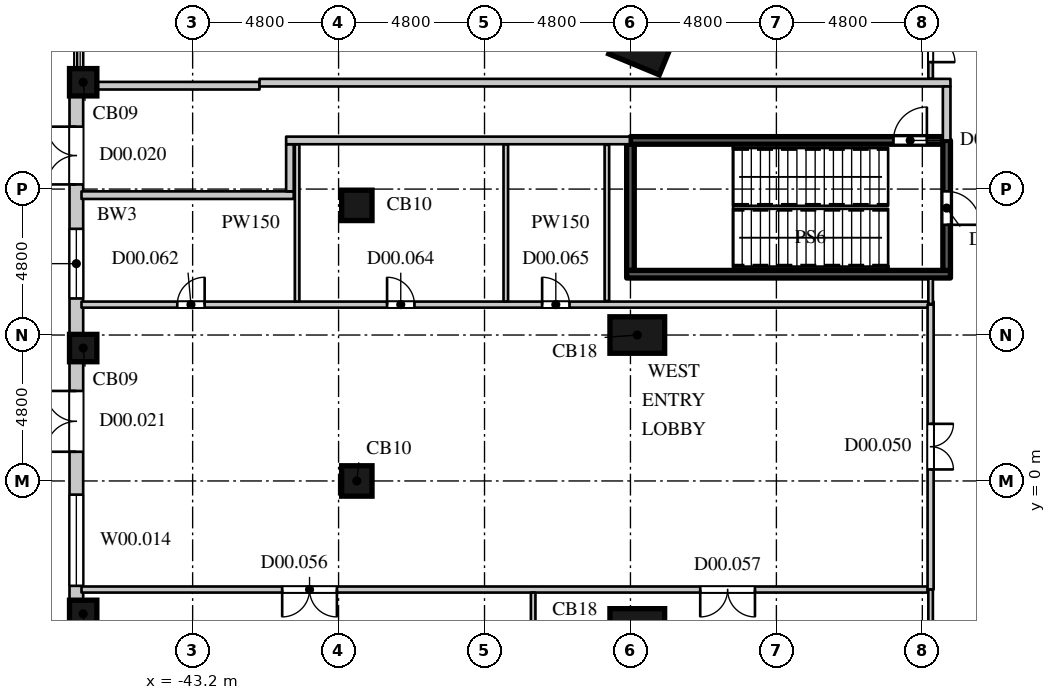
"""IFC4 building model, lengths in metres.
Left out: names, types, materials, properties, quantities, classifications, styles, units other than length and angle.
Written with IfcOpenShell. Run it as: python <this file> out.ifc"""

import sys

from ifc_helpers import new_model, si_unit, direction, frame, frame_2d, origin, origin_2d, place, context, subcontext, project, spatial, rectangle, extrude, element, fill, save


model = new_model("IFC4")
c1 = context("Model", 3, precision=1e-05, world=origin(), true_north=direction((0.0, 1.0)))
c2 = subcontext(c1, "Body", "Model", "MODEL_VIEW")
j1 = project(units=[si_unit("LENGTHUNIT", "METRE"), si_unit("PLANEANGLEUNIT", "RADIAN")], contexts=[c1])
p1 = place(None, origin())
s1 = spatial("IfcSite", under=j1, at=p1, CompositionType="ELEMENT")
p2 = place(p1, origin())
s2 = spatial("IfcBuilding", under=s1, at=p2, CompositionType="ELEMENT")
p3 = place(p2, origin())
s3 = spatial("IfcBuildingStorey", under=s2, at=p3, CompositionType="ELEMENT", Elevation=0.0)
p4 = place(p3, frame((-28.575, -4.8, 0.0), z_axis=(0.0, 0.0, 1.0), x_axis=(0.0, -1.0, 0.0)))
e1 = element("IfcColumn", 1, at=p4, inside=s3, PredefinedType="COLUMN", context=c2, shape_type="SweptSolid", body=[
    extrude(rectangle(XDim=1.2, YDim=1.8, at=origin_2d()), origin(), (0.0, 0.0, 1.0), 6.0),
])
p5 = place(p3, frame((-46.8, -4.371, 0.0), z_axis=(0.0, 0.0, 1.0), x_axis=(1.0, 0.0, 0.0)))
e2 = element("IfcColumn", 2, at=p5, inside=s3, PredefinedType="COLUMN", context=c2, shape_type="SweptSolid", body=[
    extrude(rectangle(XDim=0.9, YDim=0.9, at=origin_2d()), origin(), (0.0, 0.0, 1.0), 6.0),
])
p6 = place(p3, frame((-37.8, 0.0, 0.0), z_axis=(0.0, 0.0, 1.0), x_axis=(1.0, 0.0, 0.0)))
e3 = element("IfcColumn", 3, at=p6, inside=s3, PredefinedType="COLUMN", context=c2, shape_type="SweptSolid", body=[
    extrude(rectangle(XDim=1.0, YDim=1.0, at=origin_2d()), origin(), (0.0, 0.0, 1.0), 6.0),
])
p7 = place(p3, frame((-46.8, 4.371, 0.0), z_axis=(0.0, 0.0, 1.0), x_axis=(1.0, 0.0, 0.0)))
e4 = element("IfcColumn", 4, at=p7, inside=s3, PredefinedType="COLUMN", context=c2, shape_type="SweptSolid", body=[
    extrude(rectangle(XDim=0.9, YDim=0.9, at=origin_2d()), origin(), (0.0, 0.0, 1.0), 6.0),
])
p8 = place(p3, frame((-28.575, 4.8, 0.0), z_axis=(0.0, 0.0, 1.0), x_axis=(0.0, -1.0, 0.0)))
e5 = element("IfcColumn", 5, at=p8, inside=s3, PredefinedType="COLUMN", context=c2, shape_type="SweptSolid", body=[
    extrude(rectangle(XDim=1.2, YDim=1.8, at=origin_2d()), origin(), (0.0, 0.0, 1.0), 6.0),
])
p9 = place(p3, frame((-37.8, 9.064, 0.0), z_axis=(0.0, 0.0, 1.0), x_axis=(1.0, 0.0, 0.0)))
e6 = element("IfcColumn", 6, at=p9, inside=s3, PredefinedType="COLUMN", context=c2, shape_type="SweptSolid", body=[
    extrude(rectangle(XDim=1.0, YDim=1.0, at=origin_2d()), origin(), (0.0, 0.0, 1.0), 6.0),
])
p10 = place(p3, frame((-46.8, 13.114, 0.0), z_axis=(0.0, 0.0, 1.0), x_axis=(1.0, 0.0, 0.0)))
e7 = element("IfcColumn", 7, at=p10, inside=s3, PredefinedType="COLUMN", context=c2, shape_type="SweptSolid", body=[
    extrude(rectangle(XDim=0.9, YDim=0.9, at=origin_2d()), origin(), (0.0, 0.0, 1.0), 6.0),
])
p11 = place(p3, frame((-28.454, 14.257, 0.0), z_axis=(0.0, 0.0, 1.0), x_axis=(-0.382683496864, -0.923879505795, 0.0)))
e8 = element("IfcColumn", 8, at=p11, inside=s3, PredefinedType="COLUMN", context=c2, shape_type="SweptSolid", body=[
    extrude(rectangle(XDim=1.2, YDim=1.8, at=origin_2d()), origin(), (0.0, 0.0, 1.0), 6.0),
])
p12 = place(p3, frame((-47.025, 12.664, 0.0), z_axis=(0.0, 0.0, 1.0), x_axis=(0.0, -1.0, 0.0)))
e9 = element("IfcWall", 9, at=p12, inside=s3, PredefinedType="ELEMENTEDWALL", context=c2, shape_type="SweptSolid", body=[
    extrude(rectangle(XDim=7.842, YDim=0.45, at=frame_2d((3.921, 0.0))), origin(), (0.0, 0.0, 1.0), 4.8),
])
p13 = place(p12, frame((1.01, 0.0, 0.0)))
e10 = element("IfcOpeningElement", 10, at=p13, cuts=e9, PredefinedType="OPENING", context=c2, shape_type="SweptSolid", body=[
    extrude(rectangle(XDim=1.9, YDim=2.7, at=frame_2d((0.95, 1.35))), frame((0.0, 0.235, 0.0), z_axis=(0.0, -1.0, 0.0), x_axis=(1.0, 0.0, 0.0)), (0.0, 0.0, 1.0), 0.47),
])
p14 = place(p12, frame((4.371, 0.0, 1.05)))
e11 = element("IfcOpeningElement", 11, at=p14, cuts=e9, PredefinedType="OPENING", context=c2, shape_type="SweptSolid", body=[
    extrude(rectangle(XDim=2.29, YDim=2.7, at=frame_2d((1.145, 1.35))), frame((0.0, 0.235, 0.0), z_axis=(0.0, -1.0, 0.0), x_axis=(1.0, 0.0, 0.0)), (0.0, 0.0, 1.0), 0.47),
])
p15 = place(p3, frame((-47.025, 3.921, 0.0), z_axis=(0.0, 0.0, 1.0), x_axis=(0.0, -1.0, 0.0)))
e12 = element("IfcWall", 12, at=p15, inside=s3, PredefinedType="ELEMENTEDWALL", context=c2, shape_type="SweptSolid", body=[
    extrude(rectangle(XDim=7.842, YDim=0.45, at=frame_2d((3.921, 0.0))), origin(), (0.0, 0.0, 1.0), 4.8),
])
p16 = place(p15, frame((0.961, 0.0, 0.0)))
e13 = element("IfcOpeningElement", 13, at=p16, cuts=e12, PredefinedType="OPENING", context=c2, shape_type="SweptSolid", body=[
    extrude(rectangle(XDim=2.0, YDim=2.7, at=frame_2d((1.0, 1.35))), frame((0.0, 0.235, 0.0), z_axis=(0.0, -1.0, 0.0), x_axis=(1.0, 0.0, 0.0)), (0.0, 0.0, 1.0), 0.47),
])
p17 = place(p15, frame((4.371, 0.0, 1.05)))
e14 = element("IfcOpeningElement", 14, at=p17, cuts=e12, PredefinedType="OPENING", context=c2, shape_type="SweptSolid", body=[
    extrude(rectangle(XDim=3.0, YDim=2.7, at=frame_2d((1.5, 1.35))), frame((0.0, 0.235, 0.0), z_axis=(0.0, -1.0, 0.0), x_axis=(1.0, 0.0, 0.0)), (0.0, 0.0, 1.0), 0.47),
])
p18 = place(p3, frame((-46.855, -3.571, 0.0), z_axis=(0.0, 0.0, 1.0), x_axis=(1.0, 0.0, 0.0)))
e15 = element("IfcWall", 15, at=p18, inside=s3, PredefinedType="PARTITIONING", context=c2, shape_type="SweptSolid", body=[
    extrude(rectangle(XDim=27.827, YDim=0.2, at=frame_2d((13.914, 0.0))), origin(), (0.0, 0.0, 1.0), 5.65),
])
p19 = place(p18, frame((6.6, 0.0, 0.0)))
e16 = element("IfcOpeningElement", 16, at=p19, cuts=e15, PredefinedType="OPENING", context=c2, shape_type="SweptSolid", body=[
    extrude(rectangle(XDim=1.8, YDim=2.4, at=frame_2d((0.9, 1.2))), frame((0.0, 0.11, 0.0), z_axis=(0.0, -1.0, 0.0), x_axis=(1.0, 0.0, 0.0)), (0.0, 0.0, 1.0), 0.22),
])
p20 = place(p18, frame((20.35, 0.0, 0.0)))
e17 = element("IfcOpeningElement", 17, at=p20, cuts=e15, PredefinedType="OPENING", context=c2, shape_type="SweptSolid", body=[
    extrude(rectangle(XDim=1.8, YDim=2.4, at=frame_2d((0.9, 1.2))), frame((0.0, 0.11, 0.0), z_axis=(0.0, -1.0, 0.0), x_axis=(1.0, 0.0, 0.0)), (0.0, 0.0, 1.0), 0.22),
])
p21 = place(p3, frame((-46.855, 5.8, 0.0), z_axis=(0.0, 0.0, 1.0), x_axis=(1.0, 0.0, 0.0)))
e18 = element("IfcWall", 18, at=p21, inside=s3, PredefinedType="PARTITIONING", context=c2, shape_type="SweptSolid", body=[
    extrude(rectangle(XDim=28.027, YDim=0.2, at=frame_2d((14.014, 0.0))), origin(), (0.0, 0.0, 1.0), 5.65),
])
p22 = place(p21, frame((3.15, 0.0, 0.0)))
e19 = element("IfcOpeningElement", 19, at=p22, cuts=e18, PredefinedType="OPENING", context=c2, shape_type="SweptSolid", body=[
    extrude(rectangle(XDim=0.9, YDim=2.2, at=frame_2d((0.45, 1.1))), frame((0.0, 0.11, 0.0), z_axis=(0.0, -1.0, 0.0), x_axis=(1.0, 0.0, 0.0)), (0.0, 0.0, 1.0), 0.22),
])
p23 = place(p21, frame((10.05, 0.0, 0.0)))
e20 = element("IfcOpeningElement", 20, at=p23, cuts=e18, PredefinedType="OPENING", context=c2, shape_type="SweptSolid", body=[
    extrude(rectangle(XDim=0.9, YDim=2.2, at=frame_2d((0.45, 1.1))), frame((0.0, 0.11, 0.0), z_axis=(0.0, -1.0, 0.0), x_axis=(1.0, 0.0, 0.0)), (0.0, 0.0, 1.0), 0.22),
])
p24 = place(p21, frame((15.15, 0.0, 0.0)))
e21 = element("IfcOpeningElement", 21, at=p24, cuts=e18, PredefinedType="OPENING", context=c2, shape_type="SweptSolid", body=[
    extrude(rectangle(XDim=0.9, YDim=2.2, at=frame_2d((0.45, 1.1))), frame((0.0, 0.11, 0.0), z_axis=(0.0, -1.0, 0.0), x_axis=(1.0, 0.0, 0.0)), (0.0, 0.0, 1.0), 0.22),
])
p25 = place(p3, frame((-18.928, -3.571, 0.0), z_axis=(0.0, 0.0, 1.0), x_axis=(0.0, 1.0, 0.0)))
e22 = element("IfcWall", 22, at=p25, inside=s3, PredefinedType="PARTITIONING", context=c2, shape_type="SweptSolid", body=[
    extrude(rectangle(XDim=9.371, YDim=0.2, at=frame_2d((4.686, 0.0))), origin(), (0.0, 0.0, 1.0), 5.65),
])
p26 = place(p25, frame((3.95, 0.0, 0.0)))
e23 = element("IfcOpeningElement", 23, at=p26, cuts=e22, PredefinedType="OPENING", context=c2, shape_type="SweptSolid", body=[
    extrude(rectangle(XDim=1.5, YDim=2.2, at=frame_2d((0.75, 1.1))), frame((0.0, 0.11, 0.0), z_axis=(0.0, -1.0, 0.0), x_axis=(1.0, 0.0, 0.0)), (0.0, 0.0, 1.0), 0.22),
])
for number, where, z_axis, x_axis in (
    (24, (-39.764, 5.9, 0.0), (0.0, 0.0, 1.0), (0.0, 1.0, 0.0)),
    (25, (-32.9, 5.9, 0.0), (0.0, 0.0, 1.0), (0.0, 1.0, 0.0)),
):
    element("IfcWall", number, at=place(p3, frame(where, z_axis=z_axis, x_axis=x_axis)), inside=s3, PredefinedType="PARTITIONING", context=c2, shape_type="SweptSolid", body=[
        extrude(rectangle(XDim=5.175, YDim=0.15, at=frame_2d((2.587, 0.0))), origin(), (0.0, 0.0, 1.0), 5.65),
    ])
p27 = place(p3, frame((-32.0, -5.725, 0.0), z_axis=(0.0, 0.0, 1.0), x_axis=(0.0, 1.0, 0.0)))
e26 = element("IfcWall", 26, at=p27, inside=s3, PredefinedType="PARTITIONING", context=c2, shape_type="SweptSolid", body=[
    extrude(rectangle(XDim=2.054, YDim=0.15, at=frame_2d((1.027, 0.0))), origin(), (0.0, 0.0, 1.0), 5.65),
])
p28 = place(p3, frame((-29.575, 5.92, 0.0), z_axis=(0.0, 0.0, 1.0), x_axis=(0.0, 1.0, 0.0)))
e27 = element("IfcWall", 27, at=p28, inside=s3, PredefinedType="PARTITIONING", context=c2, shape_type="SweptSolid", body=[
    extrude(rectangle(XDim=5.135, YDim=0.15, at=frame_2d((2.567, 0.0))), origin(), (0.0, 0.0, 1.0), 5.65),
])
p29 = place(p3, frame((-18.928, -6.675, 0.0), z_axis=(0.0, 0.0, 1.0), x_axis=(0.0, 1.0, 0.0)))
e28 = element("IfcWall", 28, at=p29, inside=s3, PredefinedType="PARTITIONING", context=c2, shape_type="SweptSolid", body=[
    extrude(rectangle(XDim=3.104, YDim=0.15, at=frame_2d((1.552, 0.0))), origin(), (0.0, 0.0, 1.0), 5.65),
])
p30 = place(p3, frame((-18.928, 5.82, 0.0), z_axis=(0.0, 0.0, 1.0), x_axis=(0.0, 1.0, 0.0)))
e29 = element("IfcWall", 29, at=p30, inside=s3, PredefinedType="PARTITIONING", context=c2, shape_type="SweptSolid", body=[
    extrude(rectangle(XDim=0.835, YDim=0.15, at=frame_2d((0.417, 0.0))), origin(), (0.0, 0.0, 1.0), 5.65),
])
p31 = place(p3, frame((-18.928, 13.225, 0.0), z_axis=(0.0, 0.0, 1.0), x_axis=(0.0, 1.0, 0.0)))
e30 = element("IfcWall", 30, at=p31, inside=s3, PredefinedType="PARTITIONING", context=c2, shape_type="SweptSolid", body=[
    extrude(rectangle(XDim=2.7, YDim=0.15, at=frame_2d((1.35, 0.0))), origin(), (0.0, 0.0, 1.0), 5.65),
])
p32 = place(p31, frame((0.55, 0.0, 0.0)))
e31 = element("IfcOpeningElement", 31, at=p32, cuts=e30, PredefinedType="OPENING", context=c2, shape_type="SweptSolid", body=[
    extrude(rectangle(XDim=1.6, YDim=2.4, at=frame_2d((0.8, 1.2))), frame((0.0, 0.085, 0.0), z_axis=(0.0, -1.0, 0.0), x_axis=(1.0, 0.0, 0.0)), (0.0, 0.0, 1.0), 0.17),
])
p33 = place(p3, frame((-28.8, 6.925, 0.0), z_axis=(0.0, 0.0, 1.0), x_axis=(0.0, 1.0, 0.0)))
e32 = element("IfcWall", 32, at=p33, inside=s3, PredefinedType="SHEAR", context=c2, shape_type="SweptSolid", body=[
    extrude(rectangle(XDim=4.15, YDim=0.25, at=frame_2d((2.075, 0.0))), origin(), (0.0, 0.0, 1.0), 5.65),
])
p34 = place(p3, frame((-28.925, 6.8, 0.0), z_axis=(0.0, 0.0, 1.0), x_axis=(1.0, 0.0, 0.0)))
e33 = element("IfcWall", 33, at=p34, inside=s3, PredefinedType="SHEAR", context=c2, shape_type="SweptSolid", body=[
    extrude(rectangle(XDim=10.65, YDim=0.25, at=frame_2d((5.325, 0.0))), origin(), (0.0, 0.0, 1.0), 5.65),
])
p35 = place(p3, frame((-28.8, 11.2, 0.0), z_axis=(0.0, 0.0, 1.0), x_axis=(1.0, 0.0, 0.0)))
e34 = element("IfcWall", 34, at=p35, inside=s3, PredefinedType="SHEAR", context=c2, shape_type="SweptSolid", body=[
    extrude(rectangle(XDim=10.275, YDim=0.25, at=frame_2d((5.138, 0.0))), origin(), (0.0, 0.0, 1.0), 5.65),
])
p36 = place(p35, frame((8.65, 0.0, 0.0)))
e35 = element("IfcOpeningElement", 35, at=p36, cuts=e34, PredefinedType="OPENING", context=c2, shape_type="SweptSolid", body=[
    extrude(rectangle(XDim=1.1, YDim=2.2, at=frame_2d((0.55, 1.1))), frame((0.0, 0.135, 0.0), z_axis=(0.0, -1.0, 0.0), x_axis=(1.0, 0.0, 0.0)), (0.0, 0.0, 1.0), 0.27),
])
p37 = place(p3, frame((-18.4, 6.925, 0.0), z_axis=(0.0, 0.0, 1.0), x_axis=(0.0, 1.0, 0.0)))
e36 = element("IfcWall", 36, at=p37, inside=s3, PredefinedType="SHEAR", context=c2, shape_type="SweptSolid", body=[
    extrude(rectangle(XDim=4.275, YDim=0.25, at=frame_2d((2.137, 0.0))), origin(), (0.0, 0.0, 1.0), 5.65),
])
p38 = place(p37, frame((1.5, 0.0, 0.0)))
e37 = element("IfcOpeningElement", 37, at=p38, cuts=e36, PredefinedType="OPENING", context=c2, shape_type="SweptSolid", body=[
    extrude(rectangle(XDim=1.1, YDim=2.2, at=frame_2d((0.55, 1.1))), frame((0.0, 0.135, 0.0), z_axis=(0.0, -1.0, 0.0), x_axis=(1.0, 0.0, 0.0)), (0.0, 0.0, 1.0), 0.27),
])
p39 = place(p3, frame((-46.855, 9.4, 0.0), z_axis=(0.0, 0.0, 1.0), x_axis=(1.0, 0.0, 0.0)))
e38 = element("IfcWall", 38, at=p39, inside=s3, PredefinedType="PARTITIONING", context=c2, shape_type="SweptSolid", body=[
    extrude(rectangle(XDim=6.98, YDim=0.25, at=frame_2d((3.49, 0.0))), origin(), (0.0, 0.0, 1.0), 5.65),
])
p40 = place(p3, frame((-46.35, 13.0, 0.0), z_axis=(0.0, 0.0, 1.0), x_axis=(1.0, 0.0, 0.0)))
e39 = element("IfcWall", 39, at=p40, inside=s3, PredefinedType="PARTITIONING", context=c2, shape_type="SweptSolid", body=[
    extrude(rectangle(XDim=5.35, YDim=0.25, at=frame_2d((2.675, 0.0))), origin(), (0.0, 0.0, 1.0), 5.65),
])
p41 = place(p3, frame((-41.0, 13.1, 0.0), z_axis=(0.0, 0.0, 1.0), x_axis=(1.0, 0.0, 0.0)))
e40 = element("IfcWall", 40, at=p41, inside=s3, PredefinedType="PARTITIONING", context=c2, shape_type="SweptSolid", body=[
    extrude(rectangle(XDim=22.725, YDim=0.25, at=frame_2d((11.363, 0.0))), origin(), (0.0, 0.0, 1.0), 5.65),
])
p42 = place(p3, frame((-40.0, 9.525, 0.0), z_axis=(0.0, 0.0, 1.0), x_axis=(0.0, 1.0, 0.0)))
e41 = element("IfcWall", 41, at=p42, inside=s3, PredefinedType="PARTITIONING", context=c2, shape_type="SweptSolid", body=[
    extrude(rectangle(XDim=1.55, YDim=0.25, at=frame_2d((0.775, 0.0))), origin(), (0.0, 0.0, 1.0), 5.65),
])
p43 = place(p3, frame((-40.125, 11.2, 0.0), z_axis=(0.0, 0.0, 1.0), x_axis=(1.0, 0.0, 0.0)))
e42 = element("IfcWall", 42, at=p43, inside=s3, PredefinedType="PARTITIONING", context=c2, shape_type="SweptSolid", body=[
    extrude(rectangle(XDim=11.305, YDim=0.25, at=frame_2d((5.652, 0.0))), origin(), (0.0, 0.0, 1.0), 5.65),
])
p44 = place(p3, frame((-18.4, 11.2, 0.0), z_axis=(0.0, 0.0, 1.0), x_axis=(0.0, 1.0, 0.0)))
e43 = element("IfcWall", 43, at=p44, inside=s3, PredefinedType="PARTITIONING", context=c2, shape_type="SweptSolid", body=[
    extrude(rectangle(XDim=1.775, YDim=0.25, at=frame_2d((0.888, 0.0))), origin(), (0.0, 0.0, 1.0), 5.65),
])
p45 = place(p13, frame((1.9, 0.0, 0.0), z_axis=(0.0, 0.0, 1.0), x_axis=(-1.0, 0.0, 0.0)))
e44 = element("IfcDoor", 44, at=p45, inside=s3, OperationType="DOUBLE_DOOR_SINGLE_SWING", PredefinedType="DOOR", context=c2, shape_type="SweptSolid", body=[
    extrude(rectangle(XDim=1.9, YDim=2.7, at=frame_2d((0.95, 1.35))), frame((0.0, -0.08, 0.0), z_axis=(0.0, -1.0, 0.0), x_axis=(1.0, 0.0, 0.0)), (0.0, 0.0, 1.0), 0.05),
])
fill(e10, e44)
p46 = place(p14, origin())
e45 = element("IfcWindow", 45, at=p46, inside=s3, PartitioningType="SINGLE_PANEL", PredefinedType="WINDOW", context=c2, shape_type="SweptSolid", body=[
    extrude(rectangle(XDim=2.29, YDim=2.7, at=frame_2d((1.145, 1.35))), frame((0.0, 0.135, 0.0), z_axis=(0.0, -1.0, 0.0), x_axis=(1.0, 0.0, 0.0)), (0.0, 0.0, 1.0), 0.06),
])
fill(e11, e45)
p47 = place(p16, frame((2.0, 0.0, 0.0), z_axis=(0.0, 0.0, 1.0), x_axis=(-1.0, 0.0, 0.0)))
e46 = element("IfcDoor", 46, at=p47, inside=s3, OperationType="DOUBLE_DOOR_SINGLE_SWING", PredefinedType="DOOR", context=c2, shape_type="SweptSolid", body=[
    extrude(rectangle(XDim=2.0, YDim=2.7, at=frame_2d((1.0, 1.35))), frame((0.0, -0.08, 0.0), z_axis=(0.0, -1.0, 0.0), x_axis=(1.0, 0.0, 0.0)), (0.0, 0.0, 1.0), 0.05),
])
fill(e13, e46)
p48 = place(p17, origin())
e47 = element("IfcWindow", 47, at=p48, inside=s3, PartitioningType="SINGLE_PANEL", PredefinedType="WINDOW", context=c2, shape_type="SweptSolid", body=[
    extrude(rectangle(XDim=3.0, YDim=2.7, at=frame_2d((1.5, 1.35))), frame((0.0, 0.135, 0.0), z_axis=(0.0, -1.0, 0.0), x_axis=(1.0, 0.0, 0.0)), (0.0, 0.0, 1.0), 0.06),
])
fill(e14, e47)
p49 = place(p26, origin())
e48 = element("IfcDoor", 48, at=p49, inside=s3, OperationType="DOUBLE_DOOR_SINGLE_SWING", PredefinedType="DOOR", context=c2, shape_type="SweptSolid", body=[
    extrude(rectangle(XDim=1.5, YDim=2.2, at=frame_2d((0.75, 1.1))), frame((0.0, 0.025, 0.0), z_axis=(0.0, -1.0, 0.0), x_axis=(1.0, 0.0, 0.0)), (0.0, 0.0, 1.0), 0.05),
])
fill(e23, e48)
p50 = place(p19, origin())
e49 = element("IfcDoor", 49, at=p50, inside=s3, OperationType="DOUBLE_DOOR_SINGLE_SWING", PredefinedType="DOOR", context=c2, shape_type="SweptSolid", body=[
    extrude(rectangle(XDim=1.8, YDim=2.4, at=frame_2d((0.9, 1.2))), frame((0.0, 0.025, 0.0), z_axis=(0.0, -1.0, 0.0), x_axis=(1.0, 0.0, 0.0)), (0.0, 0.0, 1.0), 0.05),
])
fill(e16, e49)
p51 = place(p20, origin())
e50 = element("IfcDoor", 50, at=p51, inside=s3, OperationType="DOUBLE_DOOR_SINGLE_SWING", PredefinedType="DOOR", context=c2, shape_type="SweptSolid", body=[
    extrude(rectangle(XDim=1.8, YDim=2.4, at=frame_2d((0.9, 1.2))), frame((0.0, 0.025, 0.0), z_axis=(0.0, -1.0, 0.0), x_axis=(1.0, 0.0, 0.0)), (0.0, 0.0, 1.0), 0.05),
])
fill(e17, e50)
p52 = place(p22, origin())
e51 = element("IfcDoor", 51, at=p52, inside=s3, OperationType="SINGLE_SWING_RIGHT", PredefinedType="DOOR", context=c2, shape_type="SweptSolid", body=[
    extrude(rectangle(XDim=0.9, YDim=2.2, at=frame_2d((0.45, 1.1))), frame((0.0, 0.025, 0.0), z_axis=(0.0, -1.0, 0.0), x_axis=(1.0, 0.0, 0.0)), (0.0, 0.0, 1.0), 0.05),
])
fill(e19, e51)
p53 = place(p23, origin())
e52 = element("IfcDoor", 52, at=p53, inside=s3, OperationType="SINGLE_SWING_LEFT", PredefinedType="DOOR", context=c2, shape_type="SweptSolid", body=[
    extrude(rectangle(XDim=0.9, YDim=2.2, at=frame_2d((0.45, 1.1))), frame((0.0, 0.025, 0.0), z_axis=(0.0, -1.0, 0.0), x_axis=(1.0, 0.0, 0.0)), (0.0, 0.0, 1.0), 0.05),
])
fill(e20, e52)
p54 = place(p24, origin())
e53 = element("IfcDoor", 53, at=p54, inside=s3, OperationType="SINGLE_SWING_LEFT", PredefinedType="DOOR", context=c2, shape_type="SweptSolid", body=[
    extrude(rectangle(XDim=0.9, YDim=2.2, at=frame_2d((0.45, 1.1))), frame((0.0, 0.025, 0.0), z_axis=(0.0, -1.0, 0.0), x_axis=(1.0, 0.0, 0.0)), (0.0, 0.0, 1.0), 0.05),
])
fill(e21, e53)
p55 = place(p32, origin())
e54 = element("IfcDoor", 54, at=p55, inside=s3, OperationType="DOUBLE_DOOR_SINGLE_SWING", PredefinedType="DOOR", context=c2, shape_type="SweptSolid", body=[
    extrude(rectangle(XDim=1.6, YDim=2.4, at=frame_2d((0.8, 1.2))), frame((0.0, 0.025, 0.0), z_axis=(0.0, -1.0, 0.0), x_axis=(1.0, 0.0, 0.0)), (0.0, 0.0, 1.0), 0.05),
])
fill(e31, e54)
p56 = place(p38, origin())
e55 = element("IfcDoor", 55, at=p56, inside=s3, OperationType="SINGLE_SWING_RIGHT", PredefinedType="DOOR", context=c2, shape_type="SweptSolid", body=[
    extrude(rectangle(XDim=1.1, YDim=2.2, at=frame_2d((0.55, 1.1))), frame((0.0, 0.025, 0.0), z_axis=(0.0, -1.0, 0.0), x_axis=(1.0, 0.0, 0.0)), (0.0, 0.0, 1.0), 0.05),
])
fill(e37, e55)
p57 = place(p36, origin())
e56 = element("IfcDoor", 56, at=p57, inside=s3, OperationType="SINGLE_SWING_RIGHT", PredefinedType="DOOR", context=c2, shape_type="SweptSolid", body=[
    extrude(rectangle(XDim=1.1, YDim=2.2, at=frame_2d((0.55, 1.1))), frame((0.0, 0.025, 0.0), z_axis=(0.0, -1.0, 0.0), x_axis=(1.0, 0.0, 0.0)), (0.0, 0.0, 1.0), 0.05),
])
fill(e35, e56)
save(model, sys.argv[1])
